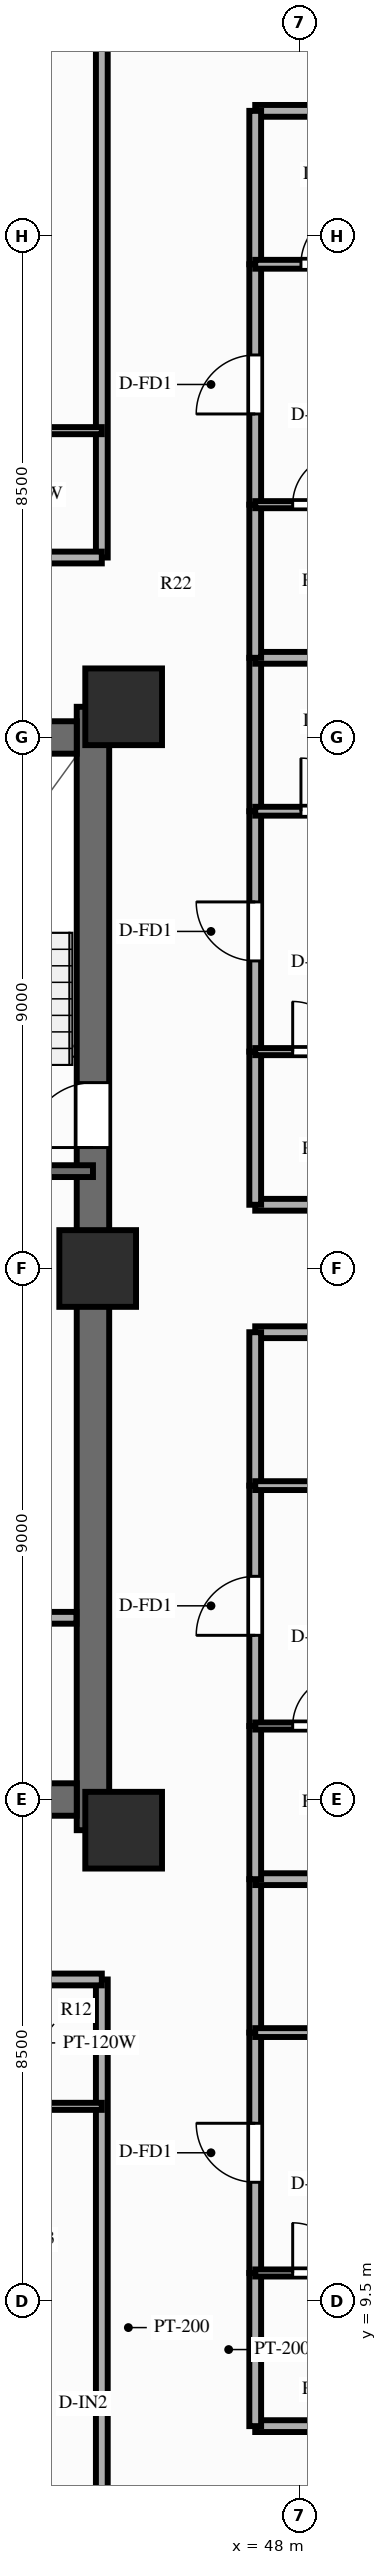
"""IFC4 building model, lengths in metres.
Left out: names, types, materials, properties, quantities, classifications, styles, units other than length and angle.
Written with IfcOpenShell. Run it as: python <this file> out.ifc"""

import sys

from ifc_helpers import new_model, si_unit, direction, frame, frame_2d, origin, origin_2d, place, context, subcontext, project, spatial, rectangle, extrude, source, transform, mapped, element, fill, save


model = new_model("IFC4")
c1 = context("Model", 3, precision=1e-05, world=origin(), true_north=direction((0.0, 1.0)))
c2 = subcontext(c1, "Body", "Model", "MODEL_VIEW")
j1 = project(units=[si_unit("LENGTHUNIT", "METRE"), si_unit("PLANEANGLEUNIT", "RADIAN")], contexts=[c1])
p1 = place(None, origin())
s1 = spatial("IfcSite", under=j1, at=p1, CompositionType="ELEMENT")
p2 = place(p1, origin())
s2 = spatial("IfcBuilding", under=s1, at=p2, CompositionType="ELEMENT")
p3 = place(p2, frame((0.0, 0.0, 110.85)))
s3 = spatial("IfcBuildingStorey", under=s2, at=p3, CompositionType="ELEMENT", Elevation=110.85)
p4 = place(p3, frame((44.5, 17.48, 0.0), z_axis=(0.0, 0.0, 1.0), x_axis=(0.0, 1.0, 0.0)))
e1 = element("IfcWall", 1, at=p4, inside=s3, PredefinedType="SHEAR", context=c2, shape_type="SweptSolid", body=[
    extrude(rectangle(XDim=19.04, YDim=0.55, at=frame_2d((9.52, 0.0))), origin(), (0.0, 0.0, 1.0), 3.0),
])
p5 = place(p4, frame((12.67, 0.0, 0.0), z_axis=(0.0, 0.0, 1.0), x_axis=(-1.0, 0.0, 0.0)))
e2 = element("IfcOpeningElement", 2, at=p5, cuts=e1, PredefinedType="OPENING", context=c2, shape_type="SweptSolid", body=[
    extrude(rectangle(XDim=1.1, YDim=2.15, at=frame_2d((0.55, 1.075))), frame((0.0, 0.287, 0.0), z_axis=(0.0, -1.0, 0.0), x_axis=(1.0, 0.0, 0.0)), (0.0, 0.0, 1.0), 0.574),
])
p6 = place(p3, frame((31.775, 18.0, 0.0), z_axis=(0.0, 0.0, 1.0), x_axis=(1.0, 0.0, 0.0)))
e3 = element("IfcWall", 3, at=p6, inside=s3, PredefinedType="SHEAR", context=c2, shape_type="SweptSolid", body=[
    extrude(rectangle(XDim=12.45, YDim=0.55, at=frame_2d((6.225, 0.0))), origin(), (0.0, 0.0, 1.0), 3.0),
])
p7 = place(p3, frame((31.775, 36.0, 0.0), z_axis=(0.0, 0.0, 1.0), x_axis=(1.0, 0.0, 0.0)))
e4 = element("IfcWall", 4, at=p7, inside=s3, PredefinedType="SHEAR", context=c2, shape_type="SweptSolid", body=[
    extrude(rectangle(XDim=12.45, YDim=0.55, at=frame_2d((6.225, 0.0))), origin(), (0.0, 0.0, 1.0), 3.0),
])
p8 = place(p7, frame((5.175, 0.0, 0.0), z_axis=(0.0, 0.0, 1.0), x_axis=(-1.0, 0.0, 0.0)))
e5 = element("IfcOpeningElement", 5, at=p8, cuts=e4, PredefinedType="OPENING", context=c2, shape_type="SweptSolid", body=[
    extrude(rectangle(XDim=1.4, YDim=2.15, at=frame_2d((0.7, 1.075))), frame((0.0, 0.287, 0.0), z_axis=(0.0, -1.0, 0.0), x_axis=(1.0, 0.0, 0.0)), (0.0, 0.0, 1.0), 0.574),
])
m1 = source(origin(), c2, "Body", "SweptSolid", [
    extrude(rectangle(XDim=1.3, YDim=1.3, at=origin_2d()), origin(), (0.0, 0.0, 1.0), 3.0),
])
for number, where, z_axis, x_axis in (
    (6, (45.02, 17.48, 0.0), (0.0, 0.0, 1.0), (1.0, 0.0, 0.0)),
    (7, (45.02, 36.52, 0.0), (0.0, 0.0, 1.0), (1.0, 0.0, 0.0)),
    (8, (44.58, 27.0, 0.0), (0.0, 0.0, 1.0), (1.0, 0.0, 0.0)),
):
    element("IfcColumn", number, at=place(p3, frame(where, z_axis=z_axis, x_axis=x_axis)), inside=s3, PredefinedType="COLUMN", context=c2, shape_type="MappedRepresentation", body=[
        mapped(m1, transform((0.0, 0.0, 0.0), scale=1.0)),
    ])
p9 = place(p3, frame((42.88, 21.08, 0.0), z_axis=(0.0, 0.0, 1.0), x_axis=(1.0, 0.0, 0.0)))
e9 = element("IfcWall", 9, at=p9, inside=s3, PredefinedType="PARTITIONING", context=c2, shape_type="SweptSolid", body=[
    extrude(rectangle(XDim=1.34, YDim=0.2, at=frame_2d((0.67, 0.0))), origin(), (0.0, 0.0, 1.0), 2.79),
])
p10 = place(p3, frame((40.57, 28.65, 0.0), z_axis=(0.0, 0.0, 1.0), x_axis=(1.0, 0.0, 0.0)))
e10 = element("IfcWall", 10, at=p10, inside=s3, PredefinedType="SOLIDWALL", context=c2, shape_type="SweptSolid", body=[
    extrude(rectangle(XDim=3.93, YDim=0.2, at=frame_2d((1.965, 0.0))), origin(), (0.0, 0.0, 1.0), 2.79),
])
p11 = place(p3, frame((44.65, 14.95, 0.0), z_axis=(0.0, 0.0, 1.0), x_axis=(0.0, -1.0, 0.0)))
e11 = element("IfcWall", 11, at=p11, inside=s3, PredefinedType="PARTITIONING", context=c2, shape_type="SweptSolid", body=[
    extrude(rectangle(XDim=11.8, YDim=0.2, at=frame_2d((5.9, 0.0))), origin(), (0.0, 0.0, 1.0), 2.34),
])
p12 = place(p3, frame((42.5, 14.95, 0.0), z_axis=(0.0, 0.0, 1.0), x_axis=(1.0, 0.0, 0.0)))
e12 = element("IfcWall", 12, at=p12, inside=s3, PredefinedType="PARTITIONING", context=c2, shape_type="SweptSolid", body=[
    extrude(rectangle(XDim=2.15, YDim=0.2, at=frame_2d((1.075, 0.0))), origin(), (0.0, 0.0, 1.0), 2.79),
])
p13 = place(p3, frame((42.5, 12.8, 0.0), z_axis=(0.0, 0.0, 1.0), x_axis=(1.0, 0.0, 0.0)))
e13 = element("IfcWall", 13, at=p13, inside=s3, PredefinedType="PARTITIONING", context=c2, shape_type="SweptSolid", body=[
    extrude(rectangle(XDim=2.15, YDim=0.12, at=frame_2d((1.075, 0.0))), origin(), (0.0, 0.0, 1.0), 2.79),
])
p14 = place(p3, frame((44.65, 39.05, 0.0), z_axis=(0.0, 0.0, 1.0), x_axis=(0.0, 1.0, 0.0)))
e14 = element("IfcWall", 14, at=p14, inside=s3, PredefinedType="PARTITIONING", context=c2, shape_type="SweptSolid", body=[
    extrude(rectangle(XDim=11.8, YDim=0.2, at=frame_2d((5.9, 0.0))), origin(), (0.0, 0.0, 1.0), 2.34),
])
p15 = place(p3, frame((42.085, 39.05, 0.0), z_axis=(0.0, 0.0, 1.0), x_axis=(1.0, 0.0, 0.0)))
e15 = element("IfcWall", 15, at=p15, inside=s3, PredefinedType="PARTITIONING", context=c2, shape_type="SweptSolid", body=[
    extrude(rectangle(XDim=2.564, YDim=0.2, at=frame_2d((1.282, 0.0))), origin(), (0.0, 0.0, 1.0), 2.79),
])
p16 = place(p3, frame((42.085, 41.2, 0.0), z_axis=(0.0, 0.0, 1.0), x_axis=(1.0, 0.0, 0.0)))
e16 = element("IfcWall", 16, at=p16, inside=s3, PredefinedType="PARTITIONING", context=c2, shape_type="SweptSolid", body=[
    extrude(rectangle(XDim=2.564, YDim=0.12, at=frame_2d((1.282, 0.0))), origin(), (0.0, 0.0, 1.0), 2.79),
])
for number, where, z_axis, x_axis in (
    (17, (47.25, 7.38, 0.0), (0.0, 0.0, 1.0), (1.0, 0.0, 0.0)),
    (18, (47.25, 25.92, 0.0), (0.0, 0.0, 1.0), (1.0, 0.0, 0.0)),
):
    element("IfcWall", number, at=place(p3, frame(where, z_axis=z_axis, x_axis=x_axis)), inside=s3, PredefinedType="PARTITIONING", context=c2, shape_type="SweptSolid", body=[
        extrude(rectangle(XDim=16.6, YDim=0.2, at=frame_2d((8.3, 0.0))), origin(), (0.0, 0.0, 1.0), 2.79),
    ])
p17 = place(p3, frame((47.25, 7.38, 0.0), z_axis=(0.0, 0.0, 1.0), x_axis=(0.0, 1.0, 0.0)))
e19 = element("IfcWall", 19, at=p17, inside=s3, PredefinedType="PARTITIONING", context=c2, shape_type="SweptSolid", body=[
    extrude(rectangle(XDim=2.596, YDim=0.2, at=frame_2d((1.298, 0.0))), origin(), (0.0, 0.0, 1.0), 2.79),
])
p18 = place(p3, frame((47.25, 9.976, 0.0), z_axis=(0.0, 0.0, 1.0), x_axis=(0.0, 1.0, 0.0)))
e20 = element("IfcWall", 20, at=p18, inside=s3, PredefinedType="PARTITIONING", context=c2, shape_type="SweptSolid", body=[
    extrude(rectangle(XDim=4.074, YDim=0.2, at=frame_2d((2.037, 0.0))), origin(), (0.0, 0.0, 1.0), 2.79),
])
p19 = place(p18, frame((1.537, 0.0, 0.0)))
e21 = element("IfcOpeningElement", 21, at=p19, cuts=e20, PredefinedType="OPENING", context=c2, shape_type="SweptSolid", body=[
    extrude(rectangle(XDim=1.0, YDim=2.15, at=frame_2d((0.5, 1.075))), frame((0.0, 0.112, 0.0), z_axis=(0.0, -1.0, 0.0), x_axis=(1.0, 0.0, 0.0)), (0.0, 0.0, 1.0), 0.224),
])
p20 = place(p3, frame((47.25, 14.05, 0.0), z_axis=(0.0, 0.0, 1.0), x_axis=(0.0, 1.0, 0.0)))
e22 = element("IfcWall", 22, at=p20, inside=s3, PredefinedType="PARTITIONING", context=c2, shape_type="SweptSolid", body=[
    extrude(rectangle(XDim=2.6, YDim=0.2, at=frame_2d((1.3, 0.0))), origin(), (0.0, 0.0, 1.0), 2.79),
])
p21 = place(p3, frame((47.25, 9.976, 0.0), z_axis=(0.0, 0.0, 1.0), x_axis=(1.0, 0.0, 0.0)))
e23 = element("IfcWall", 23, at=p21, inside=s3, PredefinedType="PARTITIONING", context=c2, shape_type="SweptSolid", body=[
    extrude(rectangle(XDim=2.12, YDim=0.12, at=frame_2d((1.06, 0.0))), origin(), (0.0, 0.0, 1.0), 2.79),
])
p22 = place(p21, frame((0.635, 0.0, 0.0)))
e24 = element("IfcOpeningElement", 24, at=p22, cuts=e23, PredefinedType="OPENING", context=c2, shape_type="SweptSolid", body=[
    extrude(rectangle(XDim=0.85, YDim=2.05, at=frame_2d((0.425, 1.025))), frame((0.0, 0.072, 0.0), z_axis=(0.0, -1.0, 0.0), x_axis=(1.0, 0.0, 0.0)), (0.0, 0.0, 1.0), 0.144),
])
p23 = place(p3, frame((47.25, 14.05, 0.0), z_axis=(0.0, 0.0, 1.0), x_axis=(1.0, 0.0, 0.0)))
e25 = element("IfcWall", 25, at=p23, inside=s3, PredefinedType="PARTITIONING", context=c2, shape_type="SweptSolid", body=[
    extrude(rectangle(XDim=2.93, YDim=0.15, at=frame_2d((1.465, 0.0))), origin(), (0.0, 0.0, 1.0), 2.79),
])
p24 = place(p23, frame((1.015, 0.0, 0.0)))
e26 = element("IfcOpeningElement", 26, at=p24, cuts=e25, PredefinedType="OPENING", context=c2, shape_type="SweptSolid", body=[
    extrude(rectangle(XDim=0.9, YDim=2.1, at=frame_2d((0.45, 1.05))), frame((0.0, 0.087, 0.0), z_axis=(0.0, -1.0, 0.0), x_axis=(1.0, 0.0, 0.0)), (0.0, 0.0, 1.0), 0.174),
])
p25 = place(p3, frame((47.25, 16.65, 0.0), z_axis=(0.0, 0.0, 1.0), x_axis=(1.0, 0.0, 0.0)))
e27 = element("IfcWall", 27, at=p25, inside=s3, PredefinedType="PARTITIONING", context=c2, shape_type="SweptSolid", body=[
    extrude(rectangle(XDim=16.6, YDim=0.2, at=frame_2d((8.3, 0.0))), origin(), (0.0, 0.0, 1.0), 2.79),
])
p26 = place(p3, frame((47.25, 16.65, 0.0), z_axis=(0.0, 0.0, 1.0), x_axis=(0.0, 1.0, 0.0)))
e28 = element("IfcWall", 28, at=p26, inside=s3, PredefinedType="PARTITIONING", context=c2, shape_type="SweptSolid", body=[
    extrude(rectangle(XDim=2.596, YDim=0.2, at=frame_2d((1.298, 0.0))), origin(), (0.0, 0.0, 1.0), 2.79),
])
p27 = place(p3, frame((47.25, 19.246, 0.0), z_axis=(0.0, 0.0, 1.0), x_axis=(0.0, 1.0, 0.0)))
e29 = element("IfcWall", 29, at=p27, inside=s3, PredefinedType="PARTITIONING", context=c2, shape_type="SweptSolid", body=[
    extrude(rectangle(XDim=4.074, YDim=0.2, at=frame_2d((2.037, 0.0))), origin(), (0.0, 0.0, 1.0), 2.79),
])
p28 = place(p27, frame((1.537, 0.0, 0.0)))
e30 = element("IfcOpeningElement", 30, at=p28, cuts=e29, PredefinedType="OPENING", context=c2, shape_type="SweptSolid", body=[
    extrude(rectangle(XDim=1.0, YDim=2.15, at=frame_2d((0.5, 1.075))), frame((0.0, 0.112, 0.0), z_axis=(0.0, -1.0, 0.0), x_axis=(1.0, 0.0, 0.0)), (0.0, 0.0, 1.0), 0.224),
])
p29 = place(p3, frame((47.25, 23.32, 0.0), z_axis=(0.0, 0.0, 1.0), x_axis=(0.0, 1.0, 0.0)))
e31 = element("IfcWall", 31, at=p29, inside=s3, PredefinedType="PARTITIONING", context=c2, shape_type="SweptSolid", body=[
    extrude(rectangle(XDim=2.6, YDim=0.2, at=frame_2d((1.3, 0.0))), origin(), (0.0, 0.0, 1.0), 2.79),
])
p30 = place(p3, frame((47.25, 19.246, 0.0), z_axis=(0.0, 0.0, 1.0), x_axis=(1.0, 0.0, 0.0)))
e32 = element("IfcWall", 32, at=p30, inside=s3, PredefinedType="PARTITIONING", context=c2, shape_type="SweptSolid", body=[
    extrude(rectangle(XDim=2.12, YDim=0.12, at=frame_2d((1.06, 0.0))), origin(), (0.0, 0.0, 1.0), 2.79),
])
p31 = place(p30, frame((0.635, 0.0, 0.0)))
e33 = element("IfcOpeningElement", 33, at=p31, cuts=e32, PredefinedType="OPENING", context=c2, shape_type="SweptSolid", body=[
    extrude(rectangle(XDim=0.85, YDim=2.05, at=frame_2d((0.425, 1.025))), frame((0.0, 0.072, 0.0), z_axis=(0.0, -1.0, 0.0), x_axis=(1.0, 0.0, 0.0)), (0.0, 0.0, 1.0), 0.144),
])
p32 = place(p3, frame((47.25, 23.32, 0.0), z_axis=(0.0, 0.0, 1.0), x_axis=(1.0, 0.0, 0.0)))
e34 = element("IfcWall", 34, at=p32, inside=s3, PredefinedType="PARTITIONING", context=c2, shape_type="SweptSolid", body=[
    extrude(rectangle(XDim=2.93, YDim=0.15, at=frame_2d((1.465, 0.0))), origin(), (0.0, 0.0, 1.0), 2.79),
])
p33 = place(p32, frame((1.015, 0.0, 0.0)))
e35 = element("IfcOpeningElement", 35, at=p33, cuts=e34, PredefinedType="OPENING", context=c2, shape_type="SweptSolid", body=[
    extrude(rectangle(XDim=0.9, YDim=2.1, at=frame_2d((0.45, 1.05))), frame((0.0, 0.087, 0.0), z_axis=(0.0, -1.0, 0.0), x_axis=(1.0, 0.0, 0.0)), (0.0, 0.0, 1.0), 0.174),
])
for number, where, z_axis, x_axis in (
    (36, (47.25, 28.08, 0.0), (0.0, 0.0, 1.0), (1.0, 0.0, 0.0)),
    (37, (47.25, 46.62, 0.0), (0.0, 0.0, 1.0), (1.0, 0.0, 0.0)),
):
    element("IfcWall", number, at=place(p3, frame(where, z_axis=z_axis, x_axis=x_axis)), inside=s3, PredefinedType="PARTITIONING", context=c2, shape_type="SweptSolid", body=[
        extrude(rectangle(XDim=16.6, YDim=0.2, at=frame_2d((8.3, 0.0))), origin(), (0.0, 0.0, 1.0), 2.79),
    ])
p34 = place(p3, frame((47.25, 28.08, 0.0), z_axis=(0.0, 0.0, 1.0), x_axis=(0.0, 1.0, 0.0)))
e38 = element("IfcWall", 38, at=p34, inside=s3, PredefinedType="PARTITIONING", context=c2, shape_type="SweptSolid", body=[
    extrude(rectangle(XDim=2.595, YDim=0.2, at=frame_2d((1.298, 0.0))), origin(), (0.0, 0.0, 1.0), 2.79),
])
p35 = place(p3, frame((47.25, 30.676, 0.0), z_axis=(0.0, 0.0, 1.0), x_axis=(0.0, 1.0, 0.0)))
e39 = element("IfcWall", 39, at=p35, inside=s3, PredefinedType="PARTITIONING", context=c2, shape_type="SweptSolid", body=[
    extrude(rectangle(XDim=4.074, YDim=0.2, at=frame_2d((2.037, 0.0))), origin(), (0.0, 0.0, 1.0), 2.79),
])
p36 = place(p35, frame((1.537, 0.0, 0.0)))
e40 = element("IfcOpeningElement", 40, at=p36, cuts=e39, PredefinedType="OPENING", context=c2, shape_type="SweptSolid", body=[
    extrude(rectangle(XDim=1.0, YDim=2.15, at=frame_2d((0.5, 1.075))), frame((0.0, 0.112, 0.0), z_axis=(0.0, -1.0, 0.0), x_axis=(1.0, 0.0, 0.0)), (0.0, 0.0, 1.0), 0.224),
])
p37 = place(p3, frame((47.25, 34.75, 0.0), z_axis=(0.0, 0.0, 1.0), x_axis=(0.0, 1.0, 0.0)))
e41 = element("IfcWall", 41, at=p37, inside=s3, PredefinedType="PARTITIONING", context=c2, shape_type="SweptSolid", body=[
    extrude(rectangle(XDim=2.6, YDim=0.2, at=frame_2d((1.3, 0.0))), origin(), (0.0, 0.0, 1.0), 2.79),
])
p38 = place(p3, frame((47.25, 30.676, 0.0), z_axis=(0.0, 0.0, 1.0), x_axis=(1.0, 0.0, 0.0)))
e42 = element("IfcWall", 42, at=p38, inside=s3, PredefinedType="PARTITIONING", context=c2, shape_type="SweptSolid", body=[
    extrude(rectangle(XDim=2.12, YDim=0.12, at=frame_2d((1.06, 0.0))), origin(), (0.0, 0.0, 1.0), 2.79),
])
p39 = place(p38, frame((0.635, 0.0, 0.0)))
e43 = element("IfcOpeningElement", 43, at=p39, cuts=e42, PredefinedType="OPENING", context=c2, shape_type="SweptSolid", body=[
    extrude(rectangle(XDim=0.85, YDim=2.05, at=frame_2d((0.425, 1.025))), frame((0.0, 0.072, 0.0), z_axis=(0.0, -1.0, 0.0), x_axis=(1.0, 0.0, 0.0)), (0.0, 0.0, 1.0), 0.144),
])
p40 = place(p3, frame((47.25, 34.75, 0.0), z_axis=(0.0, 0.0, 1.0), x_axis=(1.0, 0.0, 0.0)))
e44 = element("IfcWall", 44, at=p40, inside=s3, PredefinedType="PARTITIONING", context=c2, shape_type="SweptSolid", body=[
    extrude(rectangle(XDim=2.45, YDim=0.15, at=frame_2d((1.225, 0.0))), origin(), (0.0, 0.0, 1.0), 2.79),
])
p41 = place(p40, frame((0.775, 0.0, 0.0)))
e45 = element("IfcOpeningElement", 45, at=p41, cuts=e44, PredefinedType="OPENING", context=c2, shape_type="SweptSolid", body=[
    extrude(rectangle(XDim=0.9, YDim=2.1, at=frame_2d((0.45, 1.05))), frame((0.0, 0.087, 0.0), z_axis=(0.0, -1.0, 0.0), x_axis=(1.0, 0.0, 0.0)), (0.0, 0.0, 1.0), 0.174),
])
p42 = place(p3, frame((47.25, 37.35, 0.0), z_axis=(0.0, 0.0, 1.0), x_axis=(1.0, 0.0, 0.0)))
e46 = element("IfcWall", 46, at=p42, inside=s3, PredefinedType="PARTITIONING", context=c2, shape_type="SweptSolid", body=[
    extrude(rectangle(XDim=16.6, YDim=0.2, at=frame_2d((8.3, 0.0))), origin(), (0.0, 0.0, 1.0), 2.79),
])
p43 = place(p3, frame((47.25, 37.35, 0.0), z_axis=(0.0, 0.0, 1.0), x_axis=(0.0, 1.0, 0.0)))
e47 = element("IfcWall", 47, at=p43, inside=s3, PredefinedType="PARTITIONING", context=c2, shape_type="SweptSolid", body=[
    extrude(rectangle(XDim=2.595, YDim=0.2, at=frame_2d((1.298, 0.0))), origin(), (0.0, 0.0, 1.0), 2.79),
])
p44 = place(p3, frame((47.25, 39.946, 0.0), z_axis=(0.0, 0.0, 1.0), x_axis=(0.0, 1.0, 0.0)))
e48 = element("IfcWall", 48, at=p44, inside=s3, PredefinedType="PARTITIONING", context=c2, shape_type="SweptSolid", body=[
    extrude(rectangle(XDim=4.074, YDim=0.2, at=frame_2d((2.037, 0.0))), origin(), (0.0, 0.0, 1.0), 2.79),
])
p45 = place(p44, frame((1.537, 0.0, 0.0)))
e49 = element("IfcOpeningElement", 49, at=p45, cuts=e48, PredefinedType="OPENING", context=c2, shape_type="SweptSolid", body=[
    extrude(rectangle(XDim=1.0, YDim=2.15, at=frame_2d((0.5, 1.075))), frame((0.0, 0.112, 0.0), z_axis=(0.0, -1.0, 0.0), x_axis=(1.0, 0.0, 0.0)), (0.0, 0.0, 1.0), 0.224),
])
p46 = place(p3, frame((47.25, 44.02, 0.0), z_axis=(0.0, 0.0, 1.0), x_axis=(0.0, 1.0, 0.0)))
e50 = element("IfcWall", 50, at=p46, inside=s3, PredefinedType="PARTITIONING", context=c2, shape_type="SweptSolid", body=[
    extrude(rectangle(XDim=2.6, YDim=0.2, at=frame_2d((1.3, 0.0))), origin(), (0.0, 0.0, 1.0), 2.79),
])
p47 = place(p3, frame((47.25, 39.946, 0.0), z_axis=(0.0, 0.0, 1.0), x_axis=(1.0, 0.0, 0.0)))
e51 = element("IfcWall", 51, at=p47, inside=s3, PredefinedType="PARTITIONING", context=c2, shape_type="SweptSolid", body=[
    extrude(rectangle(XDim=2.12, YDim=0.12, at=frame_2d((1.06, 0.0))), origin(), (0.0, 0.0, 1.0), 2.79),
])
p48 = place(p47, frame((0.635, 0.0, 0.0)))
e52 = element("IfcOpeningElement", 52, at=p48, cuts=e51, PredefinedType="OPENING", context=c2, shape_type="SweptSolid", body=[
    extrude(rectangle(XDim=0.85, YDim=2.05, at=frame_2d((0.425, 1.025))), frame((0.0, 0.072, 0.0), z_axis=(0.0, -1.0, 0.0), x_axis=(1.0, 0.0, 0.0)), (0.0, 0.0, 1.0), 0.144),
])
p49 = place(p3, frame((47.25, 44.02, 0.0), z_axis=(0.0, 0.0, 1.0), x_axis=(1.0, 0.0, 0.0)))
e53 = element("IfcWall", 53, at=p49, inside=s3, PredefinedType="PARTITIONING", context=c2, shape_type="SweptSolid", body=[
    extrude(rectangle(XDim=2.45, YDim=0.15, at=frame_2d((1.225, 0.0))), origin(), (0.0, 0.0, 1.0), 2.79),
])
p50 = place(p49, frame((0.775, 0.0, 0.0)))
e54 = element("IfcOpeningElement", 54, at=p50, cuts=e53, PredefinedType="OPENING", context=c2, shape_type="SweptSolid", body=[
    extrude(rectangle(XDim=0.9, YDim=2.1, at=frame_2d((0.45, 1.05))), frame((0.0, 0.087, 0.0), z_axis=(0.0, -1.0, 0.0), x_axis=(1.0, 0.0, 0.0)), (0.0, 0.0, 1.0), 0.174),
])
m2 = source(origin(), c2, "Body", "SweptSolid", [
    extrude(rectangle(XDim=1.1, YDim=2.15, at=frame_2d((0.55, 1.075))), frame((0.0, 0.025, 0.0), z_axis=(0.0, -1.0, 0.0), x_axis=(1.0, 0.0, 0.0)), (0.0, 0.0, 1.0), 0.05),
])
p51 = place(p5, origin())
e55 = element("IfcDoor", 55, at=p51, inside=s3, OperationType="SINGLE_SWING_RIGHT", PredefinedType="DOOR", context=c2, shape_type="MappedRepresentation", body=[
    mapped(m2, transform((0.0, 0.0, 0.0), scale=1.0)),
])
fill(e2, e55)
m3 = source(origin(), c2, "Body", "SweptSolid", [
    extrude(rectangle(XDim=1.0, YDim=2.15, at=frame_2d((0.5, 1.075))), frame((0.0, 0.025, 0.0), z_axis=(0.0, -1.0, 0.0), x_axis=(1.0, 0.0, 0.0)), (0.0, 0.0, 1.0), 0.05),
])
p52 = place(p19, origin())
e56 = element("IfcDoor", 56, at=p52, inside=s3, OperationType="SINGLE_SWING_RIGHT", PredefinedType="DOOR", context=c2, shape_type="MappedRepresentation", body=[
    mapped(m3, transform((0.0, 0.0, 0.0), scale=1.0)),
])
fill(e21, e56)
m4 = source(origin(), c2, "Body", "SweptSolid", [
    extrude(rectangle(XDim=0.85, YDim=2.05, at=frame_2d((0.425, 1.025))), frame((0.0, 0.025, 0.0), z_axis=(0.0, -1.0, 0.0), x_axis=(1.0, 0.0, 0.0)), (0.0, 0.0, 1.0), 0.05),
])
p53 = place(p22, origin())
e57 = element("IfcDoor", 57, at=p53, inside=s3, OperationType="SINGLE_SWING_LEFT", PredefinedType="DOOR", context=c2, shape_type="MappedRepresentation", body=[
    mapped(m4, transform((0.0, 0.0, 0.0), scale=1.0)),
])
fill(e24, e57)
p54 = place(p28, origin())
e58 = element("IfcDoor", 58, at=p54, inside=s3, OperationType="SINGLE_SWING_LEFT", PredefinedType="DOOR", context=c2, shape_type="MappedRepresentation", body=[
    mapped(m3, transform((0.0, 0.0, 0.0), scale=1.0)),
])
fill(e30, e58)
p55 = place(p31, origin())
e59 = element("IfcDoor", 59, at=p55, inside=s3, OperationType="SINGLE_SWING_RIGHT", PredefinedType="DOOR", context=c2, shape_type="MappedRepresentation", body=[
    mapped(m4, transform((0.0, 0.0, 0.0), scale=1.0)),
])
fill(e33, e59)
p56 = place(p36, origin())
e60 = element("IfcDoor", 60, at=p56, inside=s3, OperationType="SINGLE_SWING_RIGHT", PredefinedType="DOOR", context=c2, shape_type="MappedRepresentation", body=[
    mapped(m3, transform((0.0, 0.0, 0.0), scale=1.0)),
])
fill(e40, e60)
p57 = place(p39, origin())
e61 = element("IfcDoor", 61, at=p57, inside=s3, OperationType="SINGLE_SWING_LEFT", PredefinedType="DOOR", context=c2, shape_type="MappedRepresentation", body=[
    mapped(m4, transform((0.0, 0.0, 0.0), scale=1.0)),
])
fill(e43, e61)
m5 = source(origin(), c2, "Body", "SweptSolid", [
    extrude(rectangle(XDim=0.9, YDim=2.1, at=frame_2d((0.45, 1.05))), frame((0.0, 0.025, 0.0), z_axis=(0.0, -1.0, 0.0), x_axis=(1.0, 0.0, 0.0)), (0.0, 0.0, 1.0), 0.05),
])
p58 = place(p41, origin())
e62 = element("IfcDoor", 62, at=p58, inside=s3, OperationType="SINGLE_SWING_LEFT", PredefinedType="DOOR", context=c2, shape_type="MappedRepresentation", body=[
    mapped(m5, transform((0.0, 0.0, 0.0), scale=1.0)),
])
fill(e45, e62)
p59 = place(p45, origin())
e63 = element("IfcDoor", 63, at=p59, inside=s3, OperationType="SINGLE_SWING_LEFT", PredefinedType="DOOR", context=c2, shape_type="MappedRepresentation", body=[
    mapped(m3, transform((0.0, 0.0, 0.0), scale=1.0)),
])
fill(e49, e63)
p60 = place(p48, origin())
e64 = element("IfcDoor", 64, at=p60, inside=s3, OperationType="SINGLE_SWING_RIGHT", PredefinedType="DOOR", context=c2, shape_type="MappedRepresentation", body=[
    mapped(m4, transform((0.0, 0.0, 0.0), scale=1.0)),
])
fill(e52, e64)
p61 = place(p50, origin())
e65 = element("IfcDoor", 65, at=p61, inside=s3, OperationType="SINGLE_SWING_RIGHT", PredefinedType="DOOR", context=c2, shape_type="MappedRepresentation", body=[
    mapped(m5, transform((0.0, 0.0, 0.0), scale=1.0)),
])
fill(e54, e65)
save(model, sys.argv[1])
